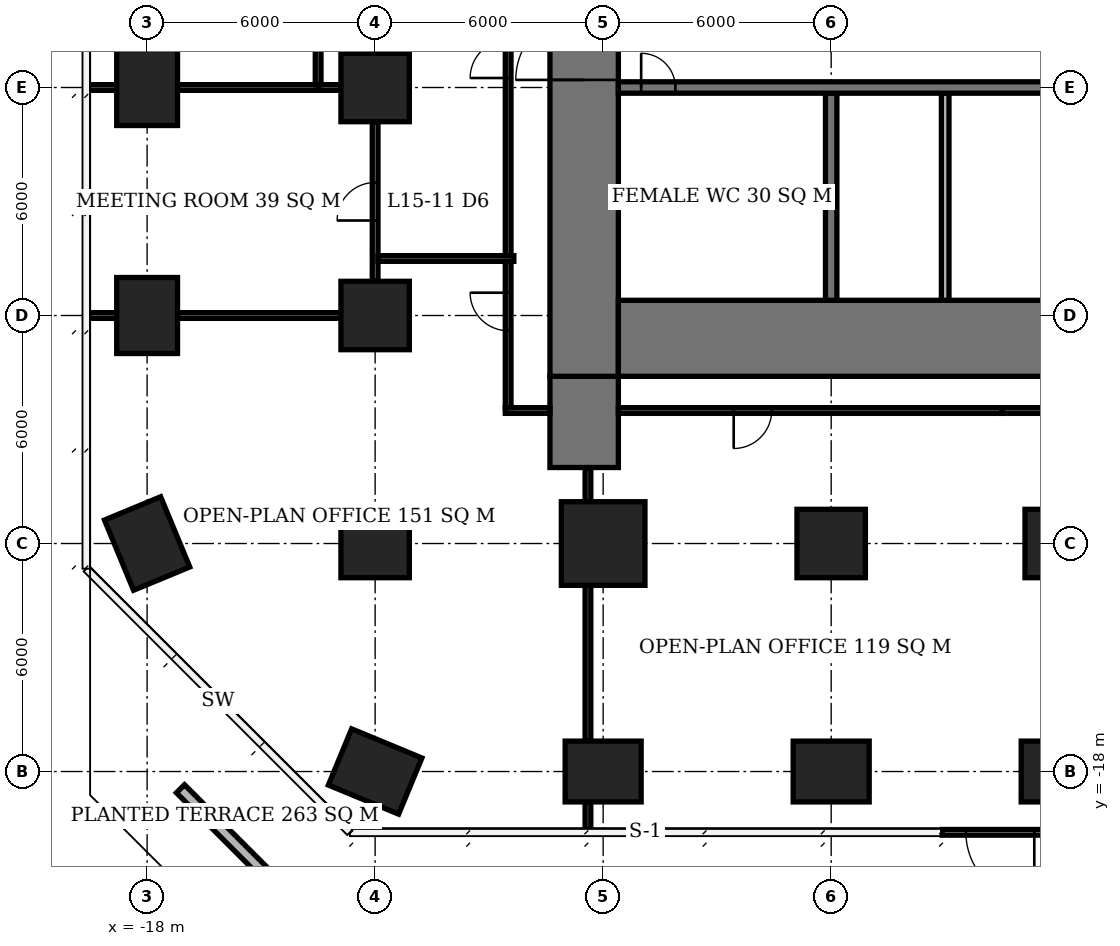
"""IFC4 building model, lengths in metres.
Left out: names, types, materials, properties, quantities, classifications, styles, units other than length and angle.
Written with IfcOpenShell. Run it as: python <this file> out.ifc"""

import sys

from ifc_helpers import new_model, si_unit, direction, frame, frame_2d, origin, origin_2d, place, context, subcontext, project, spatial, rectangle, extrude, element, fill, save


model = new_model("IFC4")
c1 = context("Model", 3, precision=1e-05, world=origin(), true_north=direction((0.0, 1.0)))
c2 = subcontext(c1, "Body", "Model", "MODEL_VIEW")
j1 = project(units=[si_unit("LENGTHUNIT", "METRE"), si_unit("PLANEANGLEUNIT", "RADIAN")], contexts=[c1])
p1 = place(None, origin())
s1 = spatial("IfcSite", under=j1, at=p1, CompositionType="ELEMENT")
p2 = place(p1, origin())
s2 = spatial("IfcBuilding", under=s1, at=p2, CompositionType="ELEMENT")
p3 = place(p2, frame((0.0, 0.0, 65.0)))
s3 = spatial("IfcBuildingStorey", under=s2, at=p3, CompositionType="ELEMENT", Elevation=65.0)
for number, where, z_axis, x_axis in (
    (1, (-18.0, -12.0, 0.0), (0.0, 0.0, 1.0), (-0.383, 0.924, 0.0)),
    (2, (-18.0, -6.0, 0.0), (0.0, 0.0, 1.0), (0.0, 1.0, 0.0)),
    (3, (-18.0, 0.0, 0.0), (0.0, 0.0, 1.0), (0.0, 1.0, 0.0)),
    (4, (-12.0, -18.0, 0.0), (0.0, 0.0, 1.0), (-0.924, 0.383, 0.0)),
):
    element("IfcColumn", number, at=place(p3, frame(where, z_axis=z_axis, x_axis=x_axis)), inside=s3, PredefinedType="COLUMN", context=c2, shape_type="SweptSolid", body=[
        extrude(rectangle(XDim=2.0, YDim=1.6, at=origin_2d()), origin(), (0.0, 0.0, 1.0), 3.9),
    ])
for number, where, z_axis, x_axis in (
    (5, (-12.0, -12.0, 0.0), (0.0, 0.0, 1.0), (1.0, 0.0, 0.0)),
    (6, (-12.0, -6.0, 0.0), (0.0, 0.0, 1.0), (1.0, 0.0, 0.0)),
    (7, (-12.0, 0.0, 0.0), (0.0, 0.0, 1.0), (1.0, 0.0, 0.0)),
):
    element("IfcColumn", number, at=place(p3, frame(where, z_axis=z_axis, x_axis=x_axis)), inside=s3, PredefinedType="COLUMN", context=c2, shape_type="SweptSolid", body=[
        extrude(rectangle(XDim=1.8, YDim=1.8, at=origin_2d()), origin(), (0.0, 0.0, 1.0), 3.9),
    ])
p4 = place(p3, frame((-6.0, -18.0, 0.0), z_axis=(0.0, 0.0, 1.0), x_axis=(1.0, 0.0, 0.0)))
e8 = element("IfcColumn", 8, at=p4, inside=s3, PredefinedType="COLUMN", context=c2, shape_type="SweptSolid", body=[
    extrude(rectangle(XDim=2.0, YDim=1.6, at=origin_2d()), origin(), (0.0, 0.0, 1.0), 3.9),
])
p5 = place(p3, frame((-6.0, -12.0, 0.0), z_axis=(0.0, 0.0, 1.0), x_axis=(1.0, 0.0, 0.0)))
e9 = element("IfcColumn", 9, at=p5, inside=s3, PredefinedType="COLUMN", context=c2, shape_type="SweptSolid", body=[
    extrude(rectangle(XDim=2.2, YDim=2.2, at=origin_2d()), origin(), (0.0, 0.0, 1.0), 3.9),
])
p6 = place(p3, frame((0.0, -18.0, 0.0), z_axis=(0.0, 0.0, 1.0), x_axis=(1.0, 0.0, 0.0)))
e10 = element("IfcColumn", 10, at=p6, inside=s3, PredefinedType="COLUMN", context=c2, shape_type="SweptSolid", body=[
    extrude(rectangle(XDim=2.0, YDim=1.6, at=origin_2d()), origin(), (0.0, 0.0, 1.0), 3.9),
])
p7 = place(p3, frame((0.0, -12.0, 0.0), z_axis=(0.0, 0.0, 1.0), x_axis=(1.0, 0.0, 0.0)))
e11 = element("IfcColumn", 11, at=p7, inside=s3, PredefinedType="COLUMN", context=c2, shape_type="SweptSolid", body=[
    extrude(rectangle(XDim=1.8, YDim=1.8, at=origin_2d()), origin(), (0.0, 0.0, 1.0), 3.9),
])
p8 = place(p3, frame((6.0, -18.0, 0.0), z_axis=(0.0, 0.0, 1.0), x_axis=(1.0, 0.0, 0.0)))
e12 = element("IfcColumn", 12, at=p8, inside=s3, PredefinedType="COLUMN", context=c2, shape_type="SweptSolid", body=[
    extrude(rectangle(XDim=2.0, YDim=1.6, at=origin_2d()), origin(), (0.0, 0.0, 1.0), 3.9),
])
p9 = place(p3, frame((6.0, -12.0, 0.0), z_axis=(0.0, 0.0, 1.0), x_axis=(1.0, 0.0, 0.0)))
e13 = element("IfcColumn", 13, at=p9, inside=s3, PredefinedType="COLUMN", context=c2, shape_type="SweptSolid", body=[
    extrude(rectangle(XDim=1.8, YDim=1.8, at=origin_2d()), origin(), (0.0, 0.0, 1.0), 3.9),
])
p10 = place(p3, frame((-5.6, -6.6, 0.0), z_axis=(0.0, 0.0, 1.0), x_axis=(1.0, 0.0, 0.0)))
e14 = element("IfcWall", 14, at=p10, inside=s3, PredefinedType="SHEAR", context=c2, shape_type="SweptSolid", body=[
    extrude(rectangle(XDim=23.2, YDim=2.0, at=frame_2d((11.6, 0.0))), origin(), (0.0, 0.0, 1.0), 3.9),
])
p11 = place(p3, frame((-6.5, -7.6, 0.0), z_axis=(0.0, 0.0, 1.0), x_axis=(0.0, 1.0, 0.0)))
e15 = element("IfcWall", 15, at=p11, inside=s3, PredefinedType="SHEAR", context=c2, shape_type="SweptSolid", body=[
    extrude(rectangle(XDim=21.2, YDim=1.8, at=frame_2d((10.6, 0.0))), origin(), (0.0, 0.0, 1.0), 3.9),
])
p12 = place(p11, frame((7.8, 0.0, 0.0)))
e16 = element("IfcOpeningElement", 16, at=p12, cuts=e15, PredefinedType="OPENING", context=c2, shape_type="SweptSolid", body=[
    extrude(rectangle(XDim=1.8, YDim=2.4, at=frame_2d((0.9, 1.2))), frame((0.0, 0.91, 0.0), z_axis=(0.0, -1.0, 0.0), x_axis=(1.0, 0.0, 0.0)), (0.0, 0.0, 1.0), 1.82),
])
p13 = place(p3, frame((-6.5, -10.0, 0.0), z_axis=(0.0, 0.0, 1.0), x_axis=(0.0, 1.0, 0.0)))
e17 = element("IfcWall", 17, at=p13, inside=s3, PredefinedType="SHEAR", context=c2, shape_type="SweptSolid", body=[
    extrude(rectangle(XDim=2.4, YDim=1.8, at=frame_2d((1.2, 0.0))), origin(), (0.0, 0.0, 1.0), 3.9),
])
p14 = place(p3, frame((-5.6, 0.0, 0.0), z_axis=(0.0, 0.0, 1.0), x_axis=(1.0, 0.0, 0.0)))
e18 = element("IfcWall", 18, at=p14, inside=s3, PredefinedType="SHEAR", context=c2, shape_type="SweptSolid", body=[
    extrude(rectangle(XDim=17.75, YDim=0.3, at=frame_2d((8.875, 0.0))), origin(), (0.0, 0.0, 1.0), 3.9),
])
p15 = place(p14, frame((0.6, 0.0, 0.0)))
e19 = element("IfcOpeningElement", 19, at=p15, cuts=e18, PredefinedType="OPENING", context=c2, shape_type="SweptSolid", body=[
    extrude(rectangle(XDim=0.9, YDim=2.1, at=frame_2d((0.45, 1.05))), frame((0.0, 0.16, 0.0), z_axis=(0.0, -1.0, 0.0), x_axis=(1.0, 0.0, 0.0)), (0.0, 0.0, 1.0), 0.32),
])
p16 = place(p3, frame((0.0, -5.6, 0.0), z_axis=(0.0, 0.0, 1.0), x_axis=(0.0, 1.0, 0.0)))
e20 = element("IfcWall", 20, at=p16, inside=s3, PredefinedType="SHEAR", context=c2, shape_type="SweptSolid", body=[
    extrude(rectangle(XDim=5.45, YDim=0.3, at=frame_2d((2.725, 0.0))), origin(), (0.0, 0.0, 1.0), 3.9),
])
p17 = place(p3, frame((3.0, -5.6, 0.0), z_axis=(0.0, 0.0, 1.0), x_axis=(0.0, 1.0, 0.0)))
e21 = element("IfcWall", 21, at=p17, inside=s3, PredefinedType="SOLIDWALL", context=c2, shape_type="SweptSolid", body=[
    extrude(rectangle(XDim=5.45, YDim=0.2, at=frame_2d((2.725, 0.0))), origin(), (0.0, 0.0, 1.0), 3.9),
])
p18 = place(p3, frame((6.042, -19.6, 0.0), z_axis=(0.0, 0.0, 1.0), x_axis=(-1.0, 0.0, 0.0)))
e22 = element("IfcWall", 22, at=p18, inside=s3, PredefinedType="USERDEFINED", context=c2, shape_type="SweptSolid", body=[
    extrude(rectangle(XDim=3.12, YDim=0.15, at=frame_2d((1.56, 0.0))), origin(), (0.0, 0.0, 1.0), 3.9),
])
p19 = place(p18, frame((0.698, 0.0, 0.0)))
e23 = element("IfcOpeningElement", 23, at=p19, cuts=e22, PredefinedType="OPENING", context=c2, shape_type="SweptSolid", body=[
    extrude(rectangle(XDim=1.8, YDim=2.4, at=frame_2d((0.9, 1.2))), frame((0.0, 0.085, 0.0), z_axis=(0.0, -1.0, 0.0), x_axis=(1.0, 0.0, 0.0)), (0.0, 0.0, 1.0), 0.17),
])
p20 = place(p3, frame((-12.453, -23.123, 0.0), z_axis=(0.0, 0.0, 1.0), x_axis=(-0.707106781187, 0.707106781187, 0.0)))
e24 = element("IfcWall", 24, at=p20, inside=s3, PredefinedType="USERDEFINED", context=c2, shape_type="SweptSolid", body=[
    extrude(rectangle(XDim=6.604, YDim=0.3, at=frame_2d((3.302, 0.0))), origin(), (0.0, 0.0, 1.0), 0.6),
])
p21 = place(p3, frame((-19.6, -6.0, 0.0), z_axis=(0.0, 0.0, 1.0), x_axis=(1.0, 0.0, 0.0)))
e25 = element("IfcWall", 25, at=p21, inside=s3, PredefinedType="PARTITIONING", context=c2, shape_type="SweptSolid", body=[
    extrude(rectangle(XDim=0.8, YDim=0.15, at=frame_2d((0.4, 0.0))), origin(), (0.0, 0.0, 1.0), 3.65),
])
p22 = place(p3, frame((-17.2, -6.0, 0.0), z_axis=(0.0, 0.0, 1.0), x_axis=(1.0, 0.0, 0.0)))
e26 = element("IfcWall", 26, at=p22, inside=s3, PredefinedType="PARTITIONING", context=c2, shape_type="SweptSolid", body=[
    extrude(rectangle(XDim=4.3, YDim=0.15, at=frame_2d((2.15, 0.0))), origin(), (0.0, 0.0, 1.0), 3.65),
])
p23 = place(p3, frame((-19.6, 0.0, 0.0), z_axis=(0.0, 0.0, 1.0), x_axis=(1.0, 0.0, 0.0)))
e27 = element("IfcWall", 27, at=p23, inside=s3, PredefinedType="PARTITIONING", context=c2, shape_type="SweptSolid", body=[
    extrude(rectangle(XDim=0.8, YDim=0.15, at=frame_2d((0.4, 0.0))), origin(), (0.0, 0.0, 1.0), 3.65),
])
p24 = place(p3, frame((-17.2, 0.0, 0.0), z_axis=(0.0, 0.0, 1.0), x_axis=(1.0, 0.0, 0.0)))
e28 = element("IfcWall", 28, at=p24, inside=s3, PredefinedType="PARTITIONING", context=c2, shape_type="SweptSolid", body=[
    extrude(rectangle(XDim=3.775, YDim=0.15, at=frame_2d((1.887, 0.0))), origin(), (0.0, 0.0, 1.0), 3.65),
])
p25 = place(p3, frame((-13.5, 0.0, 0.0), z_axis=(0.0, 0.0, 1.0), x_axis=(1.0, 0.0, 0.0)))
e29 = element("IfcWall", 29, at=p25, inside=s3, PredefinedType="PARTITIONING", context=c2, shape_type="SweptSolid", body=[
    extrude(rectangle(XDim=0.6, YDim=0.15, at=frame_2d((0.3, 0.0))), origin(), (0.0, 0.0, 1.0), 3.65),
])
p26 = place(p3, frame((-13.5, 0.075, 0.0), z_axis=(0.0, 0.0, 1.0), x_axis=(0.0, 1.0, 0.0)))
e30 = element("IfcWall", 30, at=p26, inside=s3, PredefinedType="PARTITIONING", context=c2, shape_type="SweptSolid", body=[
    extrude(rectangle(XDim=5.85, YDim=0.15, at=frame_2d((2.925, 0.0))), origin(), (0.0, 0.0, 1.0), 3.65),
])
p27 = place(p26, frame((2.425, 0.0, 0.0)))
e31 = element("IfcOpeningElement", 31, at=p27, cuts=e30, PredefinedType="OPENING", context=c2, shape_type="SweptSolid", body=[
    extrude(rectangle(XDim=1.0, YDim=2.1, at=frame_2d((0.5, 1.05))), frame((0.0, 0.085, 0.0), z_axis=(0.0, -1.0, 0.0), x_axis=(1.0, 0.0, 0.0)), (0.0, 0.0, 1.0), 0.17),
])
p28 = place(p3, frame((-12.0, -5.1, 0.0), z_axis=(0.0, 0.0, 1.0), x_axis=(0.0, 1.0, 0.0)))
e32 = element("IfcWall", 32, at=p28, inside=s3, PredefinedType="PARTITIONING", context=c2, shape_type="SweptSolid", body=[
    extrude(rectangle(XDim=4.2, YDim=0.15, at=frame_2d((2.1, 0.0))), origin(), (0.0, 0.0, 1.0), 3.65),
])
p29 = place(p28, frame((1.6, 0.0, 0.0)))
e33 = element("IfcOpeningElement", 33, at=p29, cuts=e32, PredefinedType="OPENING", context=c2, shape_type="SweptSolid", body=[
    extrude(rectangle(XDim=1.0, YDim=2.1, at=frame_2d((0.5, 1.05))), frame((0.0, 0.085, 0.0), z_axis=(0.0, -1.0, 0.0), x_axis=(1.0, 0.0, 0.0)), (0.0, 0.0, 1.0), 0.17),
])
p30 = place(p3, frame((-11.925, -4.5, 0.0), z_axis=(0.0, 0.0, 1.0), x_axis=(1.0, 0.0, 0.0)))
e34 = element("IfcWall", 34, at=p30, inside=s3, PredefinedType="PARTITIONING", context=c2, shape_type="SweptSolid", body=[
    extrude(rectangle(XDim=3.575, YDim=0.15, at=frame_2d((1.788, 0.0))), origin(), (0.0, 0.0, 1.0), 3.65),
])
p31 = place(p3, frame((-8.5, -8.425, 0.0), z_axis=(0.0, 0.0, 1.0), x_axis=(0.0, 1.0, 0.0)))
e35 = element("IfcWall", 35, at=p31, inside=s3, PredefinedType="PARTITIONING", context=c2, shape_type="SweptSolid", body=[
    extrude(rectangle(XDim=3.85, YDim=0.15, at=frame_2d((1.925, 0.0))), origin(), (0.0, 0.0, 1.0), 3.65),
])
p32 = place(p31, frame((2.025, 0.0, 0.0)))
e36 = element("IfcOpeningElement", 36, at=p32, cuts=e35, PredefinedType="OPENING", context=c2, shape_type="SweptSolid", body=[
    extrude(rectangle(XDim=1.0, YDim=2.1, at=frame_2d((0.5, 1.05))), frame((0.0, 0.085, 0.0), z_axis=(0.0, -1.0, 0.0), x_axis=(1.0, 0.0, 0.0)), (0.0, 0.0, 1.0), 0.17),
])
p33 = place(p3, frame((-8.575, -8.5, 0.0), z_axis=(0.0, 0.0, 1.0), x_axis=(1.0, 0.0, 0.0)))
e37 = element("IfcWall", 37, at=p33, inside=s3, PredefinedType="PARTITIONING", context=c2, shape_type="SweptSolid", body=[
    extrude(rectangle(XDim=1.175, YDim=0.15, at=frame_2d((0.587, 0.0))), origin(), (0.0, 0.0, 1.0), 3.65),
])
p34 = place(p3, frame((-8.5, -4.425, 0.0), z_axis=(0.0, 0.0, 1.0), x_axis=(0.0, 1.0, 0.0)))
e38 = element("IfcWall", 38, at=p34, inside=s3, PredefinedType="PARTITIONING", context=c2, shape_type="SweptSolid", body=[
    extrude(rectangle(XDim=14.85, YDim=0.15, at=frame_2d((7.425, 0.0))), origin(), (0.0, 0.0, 1.0), 3.65),
])
p35 = place(p34, frame((4.675, 0.0, 0.0)))
e39 = element("IfcOpeningElement", 39, at=p35, cuts=e38, PredefinedType="OPENING", context=c2, shape_type="SweptSolid", body=[
    extrude(rectangle(XDim=1.0, YDim=2.1, at=frame_2d((0.5, 1.05))), frame((0.0, 0.085, 0.0), z_axis=(0.0, -1.0, 0.0), x_axis=(1.0, 0.0, 0.0)), (0.0, 0.0, 1.0), 0.17),
])
p36 = place(p3, frame((-6.4, -19.55, 0.0), z_axis=(0.0, 0.0, 1.0), x_axis=(0.0, 1.0, 0.0)))
e40 = element("IfcWall", 40, at=p36, inside=s3, PredefinedType="PARTITIONING", context=c2, shape_type="SweptSolid", body=[
    extrude(rectangle(XDim=0.75, YDim=0.15, at=frame_2d((0.375, 0.0))), origin(), (0.0, 0.0, 1.0), 3.65),
])
p37 = place(p3, frame((-6.4, -17.2, 0.0), z_axis=(0.0, 0.0, 1.0), x_axis=(0.0, 1.0, 0.0)))
e41 = element("IfcWall", 41, at=p37, inside=s3, PredefinedType="PARTITIONING", context=c2, shape_type="SweptSolid", body=[
    extrude(rectangle(XDim=4.1, YDim=0.15, at=frame_2d((2.05, 0.0))), origin(), (0.0, 0.0, 1.0), 3.65),
])
p38 = place(p3, frame((-6.4, -10.9, 0.0), z_axis=(0.0, 0.0, 1.0), x_axis=(0.0, 1.0, 0.0)))
e42 = element("IfcWall", 42, at=p38, inside=s3, PredefinedType="PARTITIONING", context=c2, shape_type="SweptSolid", body=[
    extrude(rectangle(XDim=0.9, YDim=0.15, at=frame_2d((0.45, 0.0))), origin(), (0.0, 0.0, 1.0), 3.65),
])
p39 = place(p3, frame((4.5, -8.5, 0.0), z_axis=(0.0, 0.0, 1.0), x_axis=(-1.0, 0.0, 0.0)))
e43 = element("IfcWall", 43, at=p39, inside=s3, PredefinedType="PARTITIONING", context=c2, shape_type="SweptSolid", body=[
    extrude(rectangle(XDim=10.1, YDim=0.15, at=frame_2d((5.05, 0.0))), origin(), (0.0, 0.0, 1.0), 3.65),
])
p40 = place(p39, frame((6.065, 0.0, 0.0)))
e44 = element("IfcOpeningElement", 44, at=p40, cuts=e43, PredefinedType="OPENING", context=c2, shape_type="SweptSolid", body=[
    extrude(rectangle(XDim=1.0, YDim=2.1, at=frame_2d((0.5, 1.05))), frame((0.0, 0.085, 0.0), z_axis=(0.0, -1.0, 0.0), x_axis=(1.0, 0.0, 0.0)), (0.0, 0.0, 1.0), 0.17),
])
p41 = place(p3, frame((17.6, -8.5, 0.0), z_axis=(0.0, 0.0, 1.0), x_axis=(-1.0, 0.0, 0.0)))
e45 = element("IfcWall", 45, at=p41, inside=s3, PredefinedType="PARTITIONING", context=c2, shape_type="SweptSolid", body=[
    extrude(rectangle(XDim=13.1, YDim=0.15, at=frame_2d((6.55, 0.0))), origin(), (0.0, 0.0, 1.0), 3.65),
])
p42 = place(p41, frame((8.015, 0.0, 0.0)))
e46 = element("IfcOpeningElement", 46, at=p42, cuts=e45, PredefinedType="OPENING", context=c2, shape_type="SweptSolid", body=[
    extrude(rectangle(XDim=1.0, YDim=2.1, at=frame_2d((0.5, 1.05))), frame((0.0, 0.085, 0.0), z_axis=(0.0, -1.0, 0.0), x_axis=(1.0, 0.0, 0.0)), (0.0, 0.0, 1.0), 0.17),
])
p43 = place(p19, origin())
e47 = element("IfcDoor", 47, at=p43, inside=s3, OperationType="DOUBLE_DOOR_SINGLE_SWING", PredefinedType="DOOR", context=c2, shape_type="SweptSolid", body=[
    extrude(rectangle(XDim=1.8, YDim=2.4, at=frame_2d((0.9, 1.2))), frame((0.0, 0.025, 0.0), z_axis=(0.0, -1.0, 0.0), x_axis=(1.0, 0.0, 0.0)), (0.0, 0.0, 1.0), 0.05),
])
fill(e23, e47)
p44 = place(p12, origin())
e48 = element("IfcDoor", 48, at=p44, inside=s3, OperationType="DOUBLE_DOOR_SINGLE_SWING", PredefinedType="DOOR", context=c2, shape_type="SweptSolid", body=[
    extrude(rectangle(XDim=1.8, YDim=2.4, at=frame_2d((0.9, 1.2))), frame((0.0, 0.025, 0.0), z_axis=(0.0, -1.0, 0.0), x_axis=(1.0, 0.0, 0.0)), (0.0, 0.0, 1.0), 0.05),
])
fill(e16, e48)
p45 = place(p15, origin())
e49 = element("IfcDoor", 49, at=p45, inside=s3, OperationType="SINGLE_SWING_LEFT", PredefinedType="DOOR", context=c2, shape_type="SweptSolid", body=[
    extrude(rectangle(XDim=0.9, YDim=2.1, at=frame_2d((0.45, 1.05))), frame((0.0, 0.025, 0.0), z_axis=(0.0, -1.0, 0.0), x_axis=(1.0, 0.0, 0.0)), (0.0, 0.0, 1.0), 0.05),
])
fill(e19, e49)
p46 = place(p29, origin())
e50 = element("IfcDoor", 50, at=p46, inside=s3, OperationType="SINGLE_SWING_LEFT", PredefinedType="DOOR", context=c2, shape_type="SweptSolid", body=[
    extrude(rectangle(XDim=1.0, YDim=2.1, at=frame_2d((0.5, 1.05))), frame((0.0, 0.025, 0.0), z_axis=(0.0, -1.0, 0.0), x_axis=(1.0, 0.0, 0.0)), (0.0, 0.0, 1.0), 0.05),
])
fill(e33, e50)
p47 = place(p32, origin())
e51 = element("IfcDoor", 51, at=p47, inside=s3, OperationType="SINGLE_SWING_RIGHT", PredefinedType="DOOR", context=c2, shape_type="SweptSolid", body=[
    extrude(rectangle(XDim=1.0, YDim=2.1, at=frame_2d((0.5, 1.05))), frame((0.0, 0.025, 0.0), z_axis=(0.0, -1.0, 0.0), x_axis=(1.0, 0.0, 0.0)), (0.0, 0.0, 1.0), 0.05),
])
fill(e36, e51)
p48 = place(p35, origin())
e52 = element("IfcDoor", 52, at=p48, inside=s3, OperationType="SINGLE_SWING_LEFT", PredefinedType="DOOR", context=c2, shape_type="SweptSolid", body=[
    extrude(rectangle(XDim=1.0, YDim=2.1, at=frame_2d((0.5, 1.05))), frame((0.0, 0.025, 0.0), z_axis=(0.0, -1.0, 0.0), x_axis=(1.0, 0.0, 0.0)), (0.0, 0.0, 1.0), 0.05),
])
fill(e39, e52)
p49 = place(p40, origin())
e53 = element("IfcDoor", 53, at=p49, inside=s3, OperationType="SINGLE_SWING_RIGHT", PredefinedType="DOOR", context=c2, shape_type="SweptSolid", body=[
    extrude(rectangle(XDim=1.0, YDim=2.1, at=frame_2d((0.5, 1.05))), frame((0.0, 0.025, 0.0), z_axis=(0.0, -1.0, 0.0), x_axis=(1.0, 0.0, 0.0)), (0.0, 0.0, 1.0), 0.05),
])
fill(e44, e53)
save(model, sys.argv[1])
